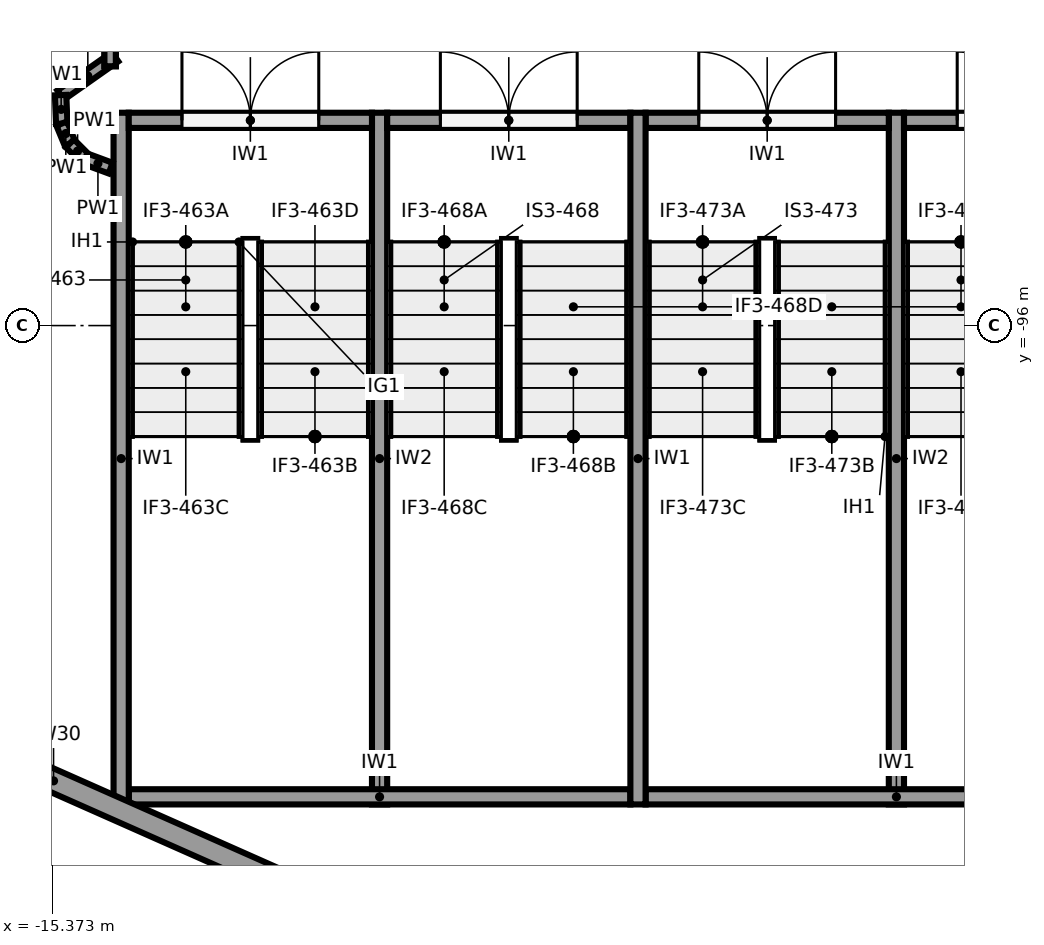
"""IFC4 building model, lengths in metres.
Left out: names, types, materials, properties, quantities, classifications, styles, units other than length and angle.
Written with IfcOpenShell. Run it as: python <this file> out.ifc"""

import sys

from ifc_helpers import new_model, si_unit, direction, frame, frame_2d, origin, place, context, subcontext, project, spatial, rectangle, extrude, element, fill, save


model = new_model("IFC4")
c1 = context("Model", 3, precision=1e-05, world=origin(), true_north=direction((0.0, 1.0)))
c2 = subcontext(c1, "Body", "Model", "MODEL_VIEW")
j1 = project(units=[si_unit("LENGTHUNIT", "METRE"), si_unit("PLANEANGLEUNIT", "RADIAN")], contexts=[c1])
p1 = place(None, origin())
s1 = spatial("IfcSite", under=j1, at=p1, CompositionType="ELEMENT")
p2 = place(p1, origin())
s2 = spatial("IfcBuilding", under=s1, at=p2, CompositionType="ELEMENT")
p3 = place(p2, frame((0.0, 0.0, 6.5)))
s3 = spatial("IfcBuildingStorey", under=s2, at=p3, CompositionType="ELEMENT", Elevation=6.5)
p4 = place(p3, frame((-8.123, -105.198, 0.0), z_axis=(0.0, 0.0, 1.0), x_axis=(-0.914138897099, 0.405401130748, 0.0)))
e1 = element("IfcWall", 1, at=p4, inside=s3, PredefinedType="SOLIDWALL", context=c2, shape_type="SweptSolid", body=[
    extrude(rectangle(XDim=15.824, YDim=0.3, at=frame_2d((7.912, 0.0))), origin(), (0.0, 0.0, 1.0), 3.85),
])
p5 = place(p4, frame((11.574, 0.0, 0.0)))
e2 = element("IfcOpeningElement", 2, at=p5, cuts=e1, PredefinedType="OPENING", context=c2, shape_type="SweptSolid", body=[
    extrude(rectangle(XDim=1.8, YDim=2.4, at=frame_2d((0.9, 1.2))), frame((0.0, 0.16, 0.0), z_axis=(0.0, -1.0, 0.0), x_axis=(1.0, 0.0, 0.0)), (0.0, 0.0, 1.0), 0.32),
])
p6 = place(p3, frame((7.256, -98.782, 0.0), z_axis=(0.0, 0.0, 1.0), x_axis=(-0.914136361455, -0.405406848322, 0.0)))
e3 = element("IfcWall", 3, at=p6, inside=s3, PredefinedType="SOLIDWALL", context=c2, shape_type="SweptSolid", body=[
    extrude(rectangle(XDim=15.824, YDim=0.35, at=frame_2d((7.912, 0.0))), origin(), (0.0, 0.0, 1.0), 3.85),
])
for number, where, z_axis, x_axis in (
    (4, (-14.467, -102.3, 0.0), (0.0, 0.0, 1.0), (0.0, 1.0, 0.0)),
    (5, (-7.667, -102.3, 0.0), (0.0, 0.0, 1.0), (0.0, 1.0, 0.0)),
):
    element("IfcWall", number, at=place(p3, frame(where, z_axis=z_axis, x_axis=x_axis)), inside=s3, PredefinedType="SHEAR", context=c2, shape_type="SweptSolid", body=[
        extrude(rectangle(XDim=9.1, YDim=0.2, at=frame_2d((4.55, 0.0))), origin(), (0.0, 0.0, 1.0), 5.15),
    ])
p7 = place(p3, frame((-14.367, -102.2, 0.0), z_axis=(0.0, 0.0, 1.0), x_axis=(1.0, 0.0, 0.0)))
e6 = element("IfcWall", 6, at=p7, inside=s3, PredefinedType="SHEAR", context=c2, shape_type="SweptSolid", body=[
    extrude(rectangle(XDim=6.6, YDim=0.2, at=frame_2d((3.3, 0.0))), origin(), (0.0, 0.0, 1.0), 5.15),
])
p8 = place(p3, frame((-7.567, -102.2, 0.0), z_axis=(0.0, 0.0, 1.0), x_axis=(1.0, 0.0, 0.0)))
e7 = element("IfcWall", 7, at=p8, inside=s3, PredefinedType="SHEAR", context=c2, shape_type="SweptSolid", body=[
    extrude(rectangle(XDim=6.6, YDim=0.2, at=frame_2d((3.3, 0.0))), origin(), (0.0, 0.0, 1.0), 5.15),
])
for number, where, z_axis, x_axis in (
    (8, (-11.067, -102.3, 0.0), (0.0, 0.0, 1.0), (0.0, 1.0, 0.0)),
    (9, (-4.267, -102.3, 0.0), (0.0, 0.0, 1.0), (0.0, 1.0, 0.0)),
):
    element("IfcWall", number, at=place(p3, frame(where, z_axis=z_axis, x_axis=x_axis)), inside=s3, PredefinedType="SHEAR", context=c2, shape_type="SweptSolid", body=[
        extrude(rectangle(XDim=9.1, YDim=0.2, at=frame_2d((4.55, 0.0))), origin(), (0.0, 0.0, 1.0), 5.15),
    ])
p9 = place(p3, frame((-14.367, -93.3, 0.0), z_axis=(0.0, 0.0, 1.0), x_axis=(1.0, 0.0, 0.0)))
e10 = element("IfcWall", 10, at=p9, inside=s3, PredefinedType="SHEAR", context=c2, shape_type="SweptSolid", body=[
    extrude(rectangle(XDim=3.2, YDim=0.2, at=frame_2d((1.6, 0.0))), origin(), (0.0, 0.0, 1.0), 5.15),
])
p10 = place(p9, frame((0.7, 0.0, 0.0)))
e11 = element("IfcOpeningElement", 11, at=p10, cuts=e10, PredefinedType="OPENING", context=c2, shape_type="SweptSolid", body=[
    extrude(rectangle(XDim=1.8, YDim=2.1, at=frame_2d((0.9, 1.05))), frame((0.0, 0.11, 0.0), z_axis=(0.0, -1.0, 0.0), x_axis=(1.0, 0.0, 0.0)), (0.0, 0.0, 1.0), 0.22),
])
p11 = place(p3, frame((-10.967, -93.3, 0.0), z_axis=(0.0, 0.0, 1.0), x_axis=(1.0, 0.0, 0.0)))
e12 = element("IfcWall", 12, at=p11, inside=s3, PredefinedType="SHEAR", context=c2, shape_type="SweptSolid", body=[
    extrude(rectangle(XDim=3.2, YDim=0.2, at=frame_2d((1.6, 0.0))), origin(), (0.0, 0.0, 1.0), 5.15),
])
p12 = place(p11, frame((0.7, 0.0, 0.0)))
e13 = element("IfcOpeningElement", 13, at=p12, cuts=e12, PredefinedType="OPENING", context=c2, shape_type="SweptSolid", body=[
    extrude(rectangle(XDim=1.8, YDim=2.1, at=frame_2d((0.9, 1.05))), frame((0.0, 0.11, 0.0), z_axis=(0.0, -1.0, 0.0), x_axis=(1.0, 0.0, 0.0)), (0.0, 0.0, 1.0), 0.22),
])
p13 = place(p3, frame((-7.567, -93.3, 0.0), z_axis=(0.0, 0.0, 1.0), x_axis=(1.0, 0.0, 0.0)))
e14 = element("IfcWall", 14, at=p13, inside=s3, PredefinedType="SHEAR", context=c2, shape_type="SweptSolid", body=[
    extrude(rectangle(XDim=3.2, YDim=0.2, at=frame_2d((1.6, 0.0))), origin(), (0.0, 0.0, 1.0), 5.15),
])
p14 = place(p13, frame((0.7, 0.0, 0.0)))
e15 = element("IfcOpeningElement", 15, at=p14, cuts=e14, PredefinedType="OPENING", context=c2, shape_type="SweptSolid", body=[
    extrude(rectangle(XDim=1.8, YDim=2.1, at=frame_2d((0.9, 1.05))), frame((0.0, 0.11, 0.0), z_axis=(0.0, -1.0, 0.0), x_axis=(1.0, 0.0, 0.0)), (0.0, 0.0, 1.0), 0.22),
])
p15 = place(p3, frame((-4.167, -93.3, 0.0), z_axis=(0.0, 0.0, 1.0), x_axis=(1.0, 0.0, 0.0)))
e16 = element("IfcWall", 16, at=p15, inside=s3, PredefinedType="SHEAR", context=c2, shape_type="SweptSolid", body=[
    extrude(rectangle(XDim=3.2, YDim=0.2, at=frame_2d((1.6, 0.0))), origin(), (0.0, 0.0, 1.0), 5.15),
])
p16 = place(p15, frame((0.7, 0.0, 0.0)))
e17 = element("IfcOpeningElement", 17, at=p16, cuts=e16, PredefinedType="OPENING", context=c2, shape_type="SweptSolid", body=[
    extrude(rectangle(XDim=1.8, YDim=2.1, at=frame_2d((0.9, 1.05))), frame((0.0, 0.11, 0.0), z_axis=(0.0, -1.0, 0.0), x_axis=(1.0, 0.0, 0.0)), (0.0, 0.0, 1.0), 0.22),
])
p17 = place(p3, frame((-14.547, -92.464, 0.0), z_axis=(0.0, 0.0, 1.0), x_axis=(-0.817670329912, -0.57568674779, 0.0)))
e18 = element("IfcWall", 18, at=p17, inside=s3, PredefinedType="PARTITIONING", context=c2, shape_type="SweptSolid", body=[
    extrude(rectangle(XDim=0.876, YDim=0.15, at=frame_2d((0.438, 0.0))), origin(), (0.0, 0.0, 1.0), 5.15),
])
p18 = place(p3, frame((-15.263, -92.968, 0.0), z_axis=(0.0, 0.0, 1.0), x_axis=(0.039007374993, -0.999238922729, 0.0)))
e19 = element("IfcWall", 19, at=p18, inside=s3, PredefinedType="PARTITIONING", context=c2, shape_type="SweptSolid", body=[
    extrude(rectangle(XDim=0.375, YDim=0.15, at=frame_2d((0.188, 0.0))), origin(), (0.0, 0.0, 1.0), 5.15),
])
p19 = place(p3, frame((-15.249, -93.343, 0.0), z_axis=(0.0, 0.0, 1.0), x_axis=(0.382275228123, -0.924048510611, 0.0)))
e20 = element("IfcWall", 20, at=p19, inside=s3, PredefinedType="PARTITIONING", context=c2, shape_type="SweptSolid", body=[
    extrude(rectangle(XDim=0.282, YDim=0.15, at=frame_2d((0.141, 0.0))), origin(), (0.0, 0.0, 1.0), 5.15),
])
p20 = place(p3, frame((-15.141, -93.604, 0.0), z_axis=(0.0, 0.0, 1.0), x_axis=(0.707106781187, -0.707106781187, 0.0)))
e21 = element("IfcWall", 21, at=p20, inside=s3, PredefinedType="PARTITIONING", context=c2, shape_type="SweptSolid", body=[
    extrude(rectangle(XDim=0.285, YDim=0.15, at=frame_2d((0.143, 0.0))), origin(), (0.0, 0.0, 1.0), 5.15),
])
p21 = place(p3, frame((-14.939, -93.805, 0.0), z_axis=(0.0, 0.0, 1.0), x_axis=(0.937897537761, -0.346912393353, 0.0)))
e22 = element("IfcWall", 22, at=p21, inside=s3, PredefinedType="PARTITIONING", context=c2, shape_type="SweptSolid", body=[
    extrude(rectangle(XDim=0.356, YDim=0.15, at=frame_2d((0.178, 0.0))), origin(), (0.0, 0.0, 1.0), 5.15),
])
p22 = place(p3, frame((-14.612, -88.088, 0.0), z_axis=(0.0, 0.0, 1.0), x_axis=(0.0, -1.0, 0.0)))
e23 = element("IfcWall", 23, at=p22, inside=s3, PredefinedType="PARTITIONING", context=c2, shape_type="SweptSolid", body=[
    extrude(rectangle(XDim=4.5, YDim=0.15, at=frame_2d((2.25, 0.0))), origin(), (0.0, 0.0, 1.0), 3.85),
])
p23 = place(p22, frame((0.95, 0.0, 0.0)))
e24 = element("IfcOpeningElement", 24, at=p23, cuts=e23, PredefinedType="OPENING", context=c2, shape_type="SweptSolid", body=[
    extrude(rectangle(XDim=1.8, YDim=2.1, at=frame_2d((0.9, 1.05))), frame((0.0, 0.085, 0.0), z_axis=(0.0, -1.0, 0.0), x_axis=(1.0, 0.0, 0.0)), (0.0, 0.0, 1.0), 0.17),
])
p24 = place(p3, frame((-14.612, -90.888, 3.85), z_axis=(0.0, 0.0, 1.0), x_axis=(0.0, -1.0, 0.0)))
e25 = element("IfcWall", 25, at=p24, inside=s3, PredefinedType="PARTITIONING", context=c2, shape_type="SweptSolid", body=[
    extrude(rectangle(XDim=1.7, YDim=0.15, at=frame_2d((0.85, 0.0))), origin(), (0.0, 0.0, 1.0), 1.3),
])
p25 = place(p10, origin())
e26 = element("IfcDoor", 26, at=p25, inside=s3, OperationType="DOUBLE_DOOR_SINGLE_SWING", PredefinedType="DOOR", context=c2, shape_type="SweptSolid", body=[
    extrude(rectangle(XDim=1.8, YDim=2.1, at=frame_2d((0.9, 1.05))), frame((0.0, 0.025, 0.0), z_axis=(0.0, -1.0, 0.0), x_axis=(1.0, 0.0, 0.0)), (0.0, 0.0, 1.0), 0.05),
])
fill(e11, e26)
p26 = place(p12, origin())
e27 = element("IfcDoor", 27, at=p26, inside=s3, OperationType="DOUBLE_DOOR_SINGLE_SWING", PredefinedType="DOOR", context=c2, shape_type="SweptSolid", body=[
    extrude(rectangle(XDim=1.8, YDim=2.1, at=frame_2d((0.9, 1.05))), frame((0.0, 0.025, 0.0), z_axis=(0.0, -1.0, 0.0), x_axis=(1.0, 0.0, 0.0)), (0.0, 0.0, 1.0), 0.05),
])
fill(e13, e27)
p27 = place(p14, origin())
e28 = element("IfcDoor", 28, at=p27, inside=s3, OperationType="DOUBLE_DOOR_SINGLE_SWING", PredefinedType="DOOR", context=c2, shape_type="SweptSolid", body=[
    extrude(rectangle(XDim=1.8, YDim=2.1, at=frame_2d((0.9, 1.05))), frame((0.0, 0.025, 0.0), z_axis=(0.0, -1.0, 0.0), x_axis=(1.0, 0.0, 0.0)), (0.0, 0.0, 1.0), 0.05),
])
fill(e15, e28)
p28 = place(p16, origin())
e29 = element("IfcDoor", 29, at=p28, inside=s3, OperationType="DOUBLE_DOOR_SINGLE_SWING", PredefinedType="DOOR", context=c2, shape_type="SweptSolid", body=[
    extrude(rectangle(XDim=1.8, YDim=2.1, at=frame_2d((0.9, 1.05))), frame((0.0, 0.025, 0.0), z_axis=(0.0, -1.0, 0.0), x_axis=(1.0, 0.0, 0.0)), (0.0, 0.0, 1.0), 0.05),
])
fill(e17, e29)
save(model, sys.argv[1])
